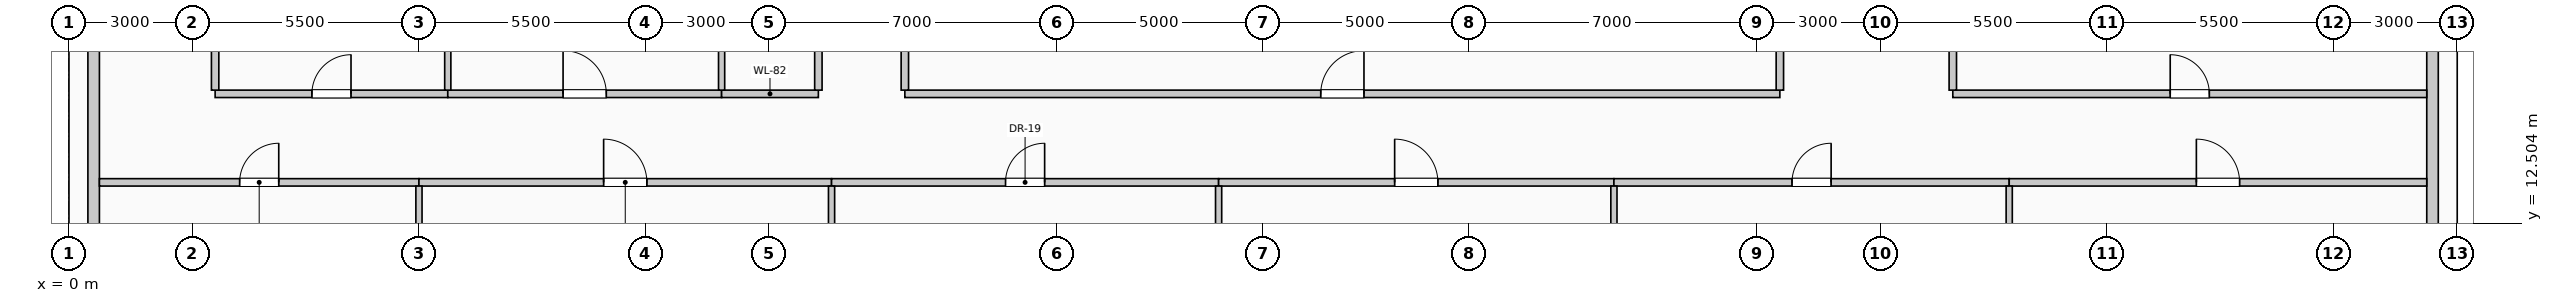
"""IFC4 building model, lengths in metres.
Left out: names, types, materials, properties, quantities, classifications, styles, units other than length and angle.
Written with IfcOpenShell. Run it as: python <this file> out.ifc"""

import sys

from ifc_helpers import new_model, si_unit, direction, frame, frame_2d, origin, place, context, subcontext, project, spatial, rectangle, extrude, element, fill, save


model = new_model("IFC4")
c1 = context("Model", 3, precision=1e-05, world=origin(), true_north=direction((0.0, 1.0)))
c2 = subcontext(c1, "Body", "Model", "MODEL_VIEW")
j1 = project(units=[si_unit("LENGTHUNIT", "METRE"), si_unit("PLANEANGLEUNIT", "RADIAN")], contexts=[c1])
p1 = place(None, origin())
s1 = spatial("IfcSite", under=j1, at=p1, CompositionType="ELEMENT")
p2 = place(p1, origin())
s2 = spatial("IfcBuilding", under=s1, at=p2, CompositionType="ELEMENT")
p3 = place(p2, frame((0.0, 0.0, 100.6)))
s3 = spatial("IfcBuildingStorey", under=s2, at=p3, CompositionType="ELEMENT", Elevation=100.6)
for number, where, z_axis, x_axis in (
    (1, (0.6, 10.445, 0.0), (0.0, 0.0, 1.0), (0.0, 1.0, 0.0)),
    (2, (57.4, 17.555, 0.0), (0.0, 0.0, 1.0), (0.0, -1.0, 0.0)),
):
    element("IfcWall", number, at=place(p3, frame(where, z_axis=z_axis, x_axis=x_axis)), inside=s3, PredefinedType="SOLIDWALL", context=c2, shape_type="SweptSolid", body=[
        extrude(rectangle(XDim=7.11, YDim=0.28, at=frame_2d((3.555, 0.0))), origin(), (0.0, 0.0, 1.0), 2.875),
    ])
p4 = place(p3, frame((0.74, 13.5, 0.0), z_axis=(0.0, 0.0, 1.0), x_axis=(1.0, 0.0, 0.0)))
e3 = element("IfcWall", 3, at=p4, inside=s3, PredefinedType="PARTITIONING", context=c2, shape_type="SweptSolid", body=[
    extrude(rectangle(XDim=7.76, YDim=0.18, at=frame_2d((3.88, 0.0))), origin(), (0.0, 0.0, 1.0), 3.725),
])
p5 = place(p4, frame((3.405, 0.0, 0.0)))
e4 = element("IfcOpeningElement", 4, at=p5, cuts=e3, PredefinedType="OPENING", context=c2, shape_type="SweptSolid", body=[
    extrude(rectangle(XDim=0.95, YDim=2.15, at=frame_2d((0.475, 1.075))), frame((0.0, 0.1, 0.0), z_axis=(0.0, -1.0, 0.0), x_axis=(1.0, 0.0, 0.0)), (0.0, 0.0, 1.0), 0.2),
])
p6 = place(p3, frame((8.5, 13.5, 0.0), z_axis=(0.0, 0.0, 1.0), x_axis=(1.0, 0.0, 0.0)))
e5 = element("IfcWall", 5, at=p6, inside=s3, PredefinedType="PARTITIONING", context=c2, shape_type="SweptSolid", body=[
    extrude(rectangle(XDim=10.02, YDim=0.18, at=frame_2d((5.01, 0.0))), origin(), (0.0, 0.0, 1.0), 3.725),
])
p7 = place(p6, frame((4.485, 0.0, 0.0)))
e6 = element("IfcOpeningElement", 6, at=p7, cuts=e5, PredefinedType="OPENING", context=c2, shape_type="SweptSolid", body=[
    extrude(rectangle(XDim=1.05, YDim=2.15, at=frame_2d((0.525, 1.075))), frame((0.0, 0.1, 0.0), z_axis=(0.0, -1.0, 0.0), x_axis=(1.0, 0.0, 0.0)), (0.0, 0.0, 1.0), 0.2),
])
p8 = place(p3, frame((18.52, 13.5, 0.0), z_axis=(0.0, 0.0, 1.0), x_axis=(1.0, 0.0, 0.0)))
e7 = element("IfcWall", 7, at=p8, inside=s3, PredefinedType="PARTITIONING", context=c2, shape_type="SweptSolid", body=[
    extrude(rectangle(XDim=9.4, YDim=0.18, at=frame_2d((4.7, 0.0))), origin(), (0.0, 0.0, 1.0), 3.725),
])
p9 = place(p8, frame((4.225, 0.0, 0.0)))
e8 = element("IfcOpeningElement", 8, at=p9, cuts=e7, PredefinedType="OPENING", context=c2, shape_type="SweptSolid", body=[
    extrude(rectangle(XDim=0.95, YDim=2.15, at=frame_2d((0.475, 1.075))), frame((0.0, 0.1, 0.0), z_axis=(0.0, -1.0, 0.0), x_axis=(1.0, 0.0, 0.0)), (0.0, 0.0, 1.0), 0.2),
])
p10 = place(p3, frame((27.92, 13.5, 0.0), z_axis=(0.0, 0.0, 1.0), x_axis=(1.0, 0.0, 0.0)))
e9 = element("IfcWall", 9, at=p10, inside=s3, PredefinedType="PARTITIONING", context=c2, shape_type="SweptSolid", body=[
    extrude(rectangle(XDim=9.6, YDim=0.18, at=frame_2d((4.8, 0.0))), origin(), (0.0, 0.0, 1.0), 3.725),
])
p11 = place(p10, frame((4.275, 0.0, 0.0)))
e10 = element("IfcOpeningElement", 10, at=p11, cuts=e9, PredefinedType="OPENING", context=c2, shape_type="SweptSolid", body=[
    extrude(rectangle(XDim=1.05, YDim=2.15, at=frame_2d((0.525, 1.075))), frame((0.0, 0.1, 0.0), z_axis=(0.0, -1.0, 0.0), x_axis=(1.0, 0.0, 0.0)), (0.0, 0.0, 1.0), 0.2),
])
p12 = place(p3, frame((37.52, 13.5, 0.0), z_axis=(0.0, 0.0, 1.0), x_axis=(1.0, 0.0, 0.0)))
e11 = element("IfcWall", 11, at=p12, inside=s3, PredefinedType="PARTITIONING", context=c2, shape_type="SweptSolid", body=[
    extrude(rectangle(XDim=9.6, YDim=0.18, at=frame_2d((4.8, 0.0))), origin(), (0.0, 0.0, 1.0), 3.725),
])
p13 = place(p12, frame((4.325, 0.0, 0.0)))
e12 = element("IfcOpeningElement", 12, at=p13, cuts=e11, PredefinedType="OPENING", context=c2, shape_type="SweptSolid", body=[
    extrude(rectangle(XDim=0.95, YDim=2.15, at=frame_2d((0.475, 1.075))), frame((0.0, 0.1, 0.0), z_axis=(0.0, -1.0, 0.0), x_axis=(1.0, 0.0, 0.0)), (0.0, 0.0, 1.0), 0.2),
])
p14 = place(p3, frame((47.12, 13.5, 0.0), z_axis=(0.0, 0.0, 1.0), x_axis=(1.0, 0.0, 0.0)))
e13 = element("IfcWall", 13, at=p14, inside=s3, PredefinedType="PARTITIONING", context=c2, shape_type="SweptSolid", body=[
    extrude(rectangle(XDim=10.14, YDim=0.18, at=frame_2d((5.07, 0.0))), origin(), (0.0, 0.0, 1.0), 3.725),
])
p15 = place(p14, frame((4.545, 0.0, 0.0)))
e14 = element("IfcOpeningElement", 14, at=p15, cuts=e13, PredefinedType="OPENING", context=c2, shape_type="SweptSolid", body=[
    extrude(rectangle(XDim=1.05, YDim=2.15, at=frame_2d((0.525, 1.075))), frame((0.0, 0.1, 0.0), z_axis=(0.0, -1.0, 0.0), x_axis=(1.0, 0.0, 0.0)), (0.0, 0.0, 1.0), 0.2),
])
p16 = place(p3, frame((3.55, 15.65, 0.0), z_axis=(0.0, 0.0, 1.0), x_axis=(1.0, 0.0, 0.0)))
e15 = element("IfcWall", 15, at=p16, inside=s3, PredefinedType="PARTITIONING", context=c2, shape_type="SweptSolid", body=[
    extrude(rectangle(XDim=5.65, YDim=0.18, at=frame_2d((2.825, 0.0))), origin(), (0.0, 0.0, 1.0), 3.725),
])
p17 = place(p16, frame((2.35, 0.0, 0.0)))
e16 = element("IfcOpeningElement", 16, at=p17, cuts=e15, PredefinedType="OPENING", context=c2, shape_type="SweptSolid", body=[
    extrude(rectangle(XDim=0.95, YDim=2.15, at=frame_2d((0.475, 1.075))), frame((0.0, 0.1, 0.0), z_axis=(0.0, -1.0, 0.0), x_axis=(1.0, 0.0, 0.0)), (0.0, 0.0, 1.0), 0.2),
])
p18 = place(p3, frame((9.2, 15.65, 0.0), z_axis=(0.0, 0.0, 1.0), x_axis=(1.0, 0.0, 0.0)))
e17 = element("IfcWall", 17, at=p18, inside=s3, PredefinedType="PARTITIONING", context=c2, shape_type="SweptSolid", body=[
    extrude(rectangle(XDim=6.65, YDim=0.18, at=frame_2d((3.325, 0.0))), origin(), (0.0, 0.0, 1.0), 3.725),
])
p19 = place(p18, frame((2.8, 0.0, 0.0)))
e18 = element("IfcOpeningElement", 18, at=p19, cuts=e17, PredefinedType="OPENING", context=c2, shape_type="SweptSolid", body=[
    extrude(rectangle(XDim=1.05, YDim=2.15, at=frame_2d((0.525, 1.075))), frame((0.0, 0.1, 0.0), z_axis=(0.0, -1.0, 0.0), x_axis=(1.0, 0.0, 0.0)), (0.0, 0.0, 1.0), 0.2),
])
p20 = place(p3, frame((15.85, 15.65, 0.0), z_axis=(0.0, 0.0, 1.0), x_axis=(1.0, 0.0, 0.0)))
e19 = element("IfcWall", 19, at=p20, inside=s3, PredefinedType="PARTITIONING", context=c2, shape_type="SweptSolid", body=[
    extrude(rectangle(XDim=2.35, YDim=0.18, at=frame_2d((1.175, 0.0))), origin(), (0.0, 0.0, 1.0), 3.725),
])
p21 = place(p3, frame((20.3, 15.65, 0.0), z_axis=(0.0, 0.0, 1.0), x_axis=(1.0, 0.0, 0.0)))
e20 = element("IfcWall", 20, at=p21, inside=s3, PredefinedType="PARTITIONING", context=c2, shape_type="SweptSolid", body=[
    extrude(rectangle(XDim=21.25, YDim=0.18, at=frame_2d((10.625, 0.0))), origin(), (0.0, 0.0, 1.0), 3.725),
])
p22 = place(p21, frame((10.1, 0.0, 0.0)))
e21 = element("IfcOpeningElement", 21, at=p22, cuts=e20, PredefinedType="OPENING", context=c2, shape_type="SweptSolid", body=[
    extrude(rectangle(XDim=1.05, YDim=2.15, at=frame_2d((0.525, 1.075))), frame((0.0, 0.1, 0.0), z_axis=(0.0, -1.0, 0.0), x_axis=(1.0, 0.0, 0.0)), (0.0, 0.0, 1.0), 0.2),
])
p23 = place(p3, frame((45.75, 15.65, 0.0), z_axis=(0.0, 0.0, 1.0), x_axis=(1.0, 0.0, 0.0)))
e22 = element("IfcWall", 22, at=p23, inside=s3, PredefinedType="PARTITIONING", context=c2, shape_type="SweptSolid", body=[
    extrude(rectangle(XDim=11.51, YDim=0.18, at=frame_2d((5.755, 0.0))), origin(), (0.0, 0.0, 1.0), 3.725),
])
p24 = place(p23, frame((5.28, 0.0, 0.0)))
e23 = element("IfcOpeningElement", 23, at=p24, cuts=e22, PredefinedType="OPENING", context=c2, shape_type="SweptSolid", body=[
    extrude(rectangle(XDim=0.95, YDim=2.15, at=frame_2d((0.475, 1.075))), frame((0.0, 0.1, 0.0), z_axis=(0.0, -1.0, 0.0), x_axis=(1.0, 0.0, 0.0)), (0.0, 0.0, 1.0), 0.2),
])
p25 = place(p3, frame((3.55, 15.74, 0.0), z_axis=(0.0, 0.0, 1.0), x_axis=(0.0, 1.0, 0.0)))
e24 = element("IfcWall", 24, at=p25, inside=s3, PredefinedType="PARTITIONING", context=c2, shape_type="SweptSolid", body=[
    extrude(rectangle(XDim=3.135, YDim=0.18, at=frame_2d((1.567, 0.0))), origin(), (0.0, 0.0, 1.0), 3.725),
])
p26 = place(p3, frame((8.5, 1.175, 0.0), z_axis=(0.0, 0.0, 1.0), x_axis=(0.0, 1.0, 0.0)))
e25 = element("IfcWall", 25, at=p26, inside=s3, PredefinedType="PARTITIONING", context=c2, shape_type="SweptSolid", body=[
    extrude(rectangle(XDim=12.235, YDim=0.15, at=frame_2d((6.117, 0.0))), origin(), (0.0, 0.0, 1.0), 3.725),
])
p27 = place(p3, frame((9.2, 15.74, 0.0), z_axis=(0.0, 0.0, 1.0), x_axis=(0.0, 1.0, 0.0)))
e26 = element("IfcWall", 26, at=p27, inside=s3, PredefinedType="PARTITIONING", context=c2, shape_type="SweptSolid", body=[
    extrude(rectangle(XDim=3.135, YDim=0.15, at=frame_2d((1.567, 0.0))), origin(), (0.0, 0.0, 1.0), 3.725),
])
p28 = place(p3, frame((15.85, 15.74, 0.0), z_axis=(0.0, 0.0, 1.0), x_axis=(0.0, 1.0, 0.0)))
e27 = element("IfcWall", 27, at=p28, inside=s3, PredefinedType="PARTITIONING", context=c2, shape_type="SweptSolid", body=[
    extrude(rectangle(XDim=1.76, YDim=0.15, at=frame_2d((0.88, 0.0))), origin(), (0.0, 0.0, 1.0), 3.725),
])
p29 = place(p3, frame((18.2, 15.74, 0.0), z_axis=(0.0, 0.0, 1.0), x_axis=(0.0, 1.0, 0.0)))
e28 = element("IfcWall", 28, at=p29, inside=s3, PredefinedType="PARTITIONING", context=c2, shape_type="SweptSolid", body=[
    extrude(rectangle(XDim=14.37, YDim=0.18, at=frame_2d((7.185, 0.0))), origin(), (0.0, 0.0, 1.0), 3.725),
])
p30 = place(p3, frame((18.52, 0.74, 0.0), z_axis=(0.0, 0.0, 1.0), x_axis=(0.0, 1.0, 0.0)))
e29 = element("IfcWall", 29, at=p30, inside=s3, PredefinedType="PARTITIONING", context=c2, shape_type="SweptSolid", body=[
    extrude(rectangle(XDim=12.67, YDim=0.15, at=frame_2d((6.335, 0.0))), origin(), (0.0, 0.0, 1.0), 3.725),
])
p31 = place(p3, frame((20.3, 15.74, 0.0), z_axis=(0.0, 0.0, 1.0), x_axis=(0.0, 1.0, 0.0)))
e30 = element("IfcWall", 30, at=p31, inside=s3, PredefinedType="PARTITIONING", context=c2, shape_type="SweptSolid", body=[
    extrude(rectangle(XDim=14.37, YDim=0.18, at=frame_2d((7.185, 0.0))), origin(), (0.0, 0.0, 1.0), 3.725),
])
for number, where, z_axis, x_axis in (
    (31, (27.92, 0.74, 0.0), (0.0, 0.0, 1.0), (0.0, 1.0, 0.0)),
    (32, (37.52, 0.74, 0.0), (0.0, 0.0, 1.0), (0.0, 1.0, 0.0)),
):
    element("IfcWall", number, at=place(p3, frame(where, z_axis=z_axis, x_axis=x_axis)), inside=s3, PredefinedType="PARTITIONING", context=c2, shape_type="SweptSolid", body=[
        extrude(rectangle(XDim=12.67, YDim=0.15, at=frame_2d((6.335, 0.0))), origin(), (0.0, 0.0, 1.0), 3.725),
    ])
p32 = place(p3, frame((41.55, 15.74, 0.0), z_axis=(0.0, 0.0, 1.0), x_axis=(0.0, 1.0, 0.0)))
e33 = element("IfcWall", 33, at=p32, inside=s3, PredefinedType="PARTITIONING", context=c2, shape_type="SweptSolid", body=[
    extrude(rectangle(XDim=1.76, YDim=0.18, at=frame_2d((0.88, 0.0))), origin(), (0.0, 0.0, 1.0), 3.07),
])
p33 = place(p3, frame((45.75, 15.74, 0.0), z_axis=(0.0, 0.0, 1.0), x_axis=(0.0, 1.0, 0.0)))
e34 = element("IfcWall", 34, at=p33, inside=s3, PredefinedType="PARTITIONING", context=c2, shape_type="SweptSolid", body=[
    extrude(rectangle(XDim=9.335, YDim=0.18, at=frame_2d((4.667, 0.0))), origin(), (0.0, 0.0, 1.0), 3.725),
])
p34 = place(p3, frame((47.12, 0.74, 0.0), z_axis=(0.0, 0.0, 1.0), x_axis=(0.0, 1.0, 0.0)))
e35 = element("IfcWall", 35, at=p34, inside=s3, PredefinedType="PARTITIONING", context=c2, shape_type="SweptSolid", body=[
    extrude(rectangle(XDim=12.67, YDim=0.15, at=frame_2d((6.335, 0.0))), origin(), (0.0, 0.0, 1.0), 3.725),
])
p35 = place(p5, origin())
e36 = element("IfcDoor", 36, at=p35, inside=s3, OperationType="SINGLE_SWING_RIGHT", PredefinedType="DOOR", context=c2, shape_type="SweptSolid", body=[
    extrude(rectangle(XDim=0.95, YDim=2.15, at=frame_2d((0.475, 1.075))), frame((0.0, 0.025, 0.0), z_axis=(0.0, -1.0, 0.0), x_axis=(1.0, 0.0, 0.0)), (0.0, 0.0, 1.0), 0.05),
])
fill(e4, e36)
p36 = place(p7, origin())
e37 = element("IfcDoor", 37, at=p36, inside=s3, OperationType="SINGLE_SWING_LEFT", PredefinedType="DOOR", context=c2, shape_type="SweptSolid", body=[
    extrude(rectangle(XDim=1.05, YDim=2.15, at=frame_2d((0.525, 1.075))), frame((0.0, 0.025, 0.0), z_axis=(0.0, -1.0, 0.0), x_axis=(1.0, 0.0, 0.0)), (0.0, 0.0, 1.0), 0.05),
])
fill(e6, e37)
p37 = place(p9, origin())
e38 = element("IfcDoor", 38, at=p37, inside=s3, OperationType="SINGLE_SWING_RIGHT", PredefinedType="DOOR", context=c2, shape_type="SweptSolid", body=[
    extrude(rectangle(XDim=0.95, YDim=2.15, at=frame_2d((0.475, 1.075))), frame((0.0, 0.025, 0.0), z_axis=(0.0, -1.0, 0.0), x_axis=(1.0, 0.0, 0.0)), (0.0, 0.0, 1.0), 0.05),
])
fill(e8, e38)
p38 = place(p11, origin())
e39 = element("IfcDoor", 39, at=p38, inside=s3, OperationType="SINGLE_SWING_LEFT", PredefinedType="DOOR", context=c2, shape_type="SweptSolid", body=[
    extrude(rectangle(XDim=1.05, YDim=2.15, at=frame_2d((0.525, 1.075))), frame((0.0, 0.025, 0.0), z_axis=(0.0, -1.0, 0.0), x_axis=(1.0, 0.0, 0.0)), (0.0, 0.0, 1.0), 0.05),
])
fill(e10, e39)
p39 = place(p13, origin())
e40 = element("IfcDoor", 40, at=p39, inside=s3, OperationType="SINGLE_SWING_RIGHT", PredefinedType="DOOR", context=c2, shape_type="SweptSolid", body=[
    extrude(rectangle(XDim=0.95, YDim=2.15, at=frame_2d((0.475, 1.075))), frame((0.0, 0.025, 0.0), z_axis=(0.0, -1.0, 0.0), x_axis=(1.0, 0.0, 0.0)), (0.0, 0.0, 1.0), 0.05),
])
fill(e12, e40)
p40 = place(p15, origin())
e41 = element("IfcDoor", 41, at=p40, inside=s3, OperationType="SINGLE_SWING_LEFT", PredefinedType="DOOR", context=c2, shape_type="SweptSolid", body=[
    extrude(rectangle(XDim=1.05, YDim=2.15, at=frame_2d((0.525, 1.075))), frame((0.0, 0.025, 0.0), z_axis=(0.0, -1.0, 0.0), x_axis=(1.0, 0.0, 0.0)), (0.0, 0.0, 1.0), 0.05),
])
fill(e14, e41)
p41 = place(p17, origin())
e42 = element("IfcDoor", 42, at=p41, inside=s3, OperationType="SINGLE_SWING_RIGHT", PredefinedType="DOOR", context=c2, shape_type="SweptSolid", body=[
    extrude(rectangle(XDim=0.95, YDim=2.15, at=frame_2d((0.475, 1.075))), frame((0.0, 0.025, 0.0), z_axis=(0.0, -1.0, 0.0), x_axis=(1.0, 0.0, 0.0)), (0.0, 0.0, 1.0), 0.05),
])
fill(e16, e42)
p42 = place(p19, origin())
e43 = element("IfcDoor", 43, at=p42, inside=s3, OperationType="SINGLE_SWING_LEFT", PredefinedType="DOOR", context=c2, shape_type="SweptSolid", body=[
    extrude(rectangle(XDim=1.05, YDim=2.15, at=frame_2d((0.525, 1.075))), frame((0.0, 0.025, 0.0), z_axis=(0.0, -1.0, 0.0), x_axis=(1.0, 0.0, 0.0)), (0.0, 0.0, 1.0), 0.05),
])
fill(e18, e43)
p43 = place(p22, origin())
e44 = element("IfcDoor", 44, at=p43, inside=s3, OperationType="SINGLE_SWING_RIGHT", PredefinedType="DOOR", context=c2, shape_type="SweptSolid", body=[
    extrude(rectangle(XDim=1.05, YDim=2.15, at=frame_2d((0.525, 1.075))), frame((0.0, 0.025, 0.0), z_axis=(0.0, -1.0, 0.0), x_axis=(1.0, 0.0, 0.0)), (0.0, 0.0, 1.0), 0.05),
])
fill(e21, e44)
p44 = place(p24, origin())
e45 = element("IfcDoor", 45, at=p44, inside=s3, OperationType="SINGLE_SWING_LEFT", PredefinedType="DOOR", context=c2, shape_type="SweptSolid", body=[
    extrude(rectangle(XDim=0.95, YDim=2.15, at=frame_2d((0.475, 1.075))), frame((0.0, 0.025, 0.0), z_axis=(0.0, -1.0, 0.0), x_axis=(1.0, 0.0, 0.0)), (0.0, 0.0, 1.0), 0.05),
])
fill(e23, e45)
save(model, sys.argv[1])
